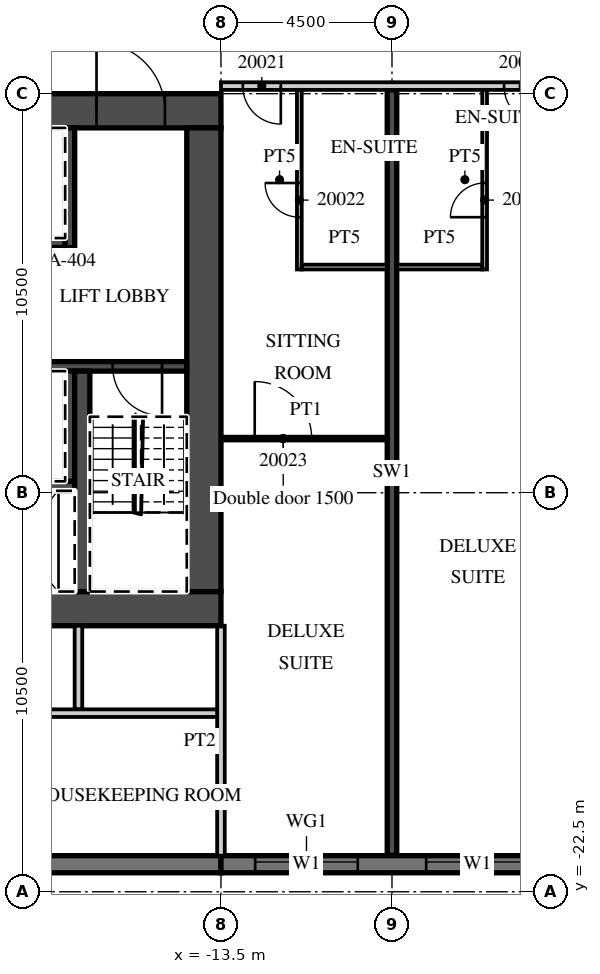
"""IFC4 building model, lengths in metres.
Left out: names, types, materials, properties, quantities, classifications, styles, units other than length and angle.
Written with IfcOpenShell. Run it as: python <this file> out.ifc"""

import sys

from ifc_helpers import new_model, si_unit, direction, frame, frame_2d, origin, place, context, subcontext, project, spatial, rectangle, extrude, element, fill, save


model = new_model("IFC4")
c1 = context("Model", 3, precision=1e-05, world=origin(), true_north=direction((0.0, 1.0)))
c2 = subcontext(c1, "Body", "Model", "MODEL_VIEW")
j1 = project(units=[si_unit("LENGTHUNIT", "METRE"), si_unit("PLANEANGLEUNIT", "RADIAN")], contexts=[c1])
p1 = place(None, origin())
s1 = spatial("IfcSite", under=j1, at=p1, CompositionType="ELEMENT")
p2 = place(p1, origin())
s2 = spatial("IfcBuilding", under=s1, at=p2, CompositionType="ELEMENT")
p3 = place(p2, frame((0.0, 0.0, 96.3)))
s3 = spatial("IfcBuildingStorey", under=s2, at=p3, CompositionType="ELEMENT", Elevation=96.3)
p4 = place(p3, frame((-9.0, -21.54, 0.0), z_axis=(0.0, 0.0, 1.0), x_axis=(0.0, 1.0, 0.0)))
e1 = element("IfcWall", 1, at=p4, inside=s3, PredefinedType="SHEAR", context=c2, shape_type="SweptSolid", body=[
    extrude(rectangle(XDim=20.14, YDim=0.25, at=frame_2d((10.07, 0.0))), origin(), (0.0, 0.0, 1.0), 3.0),
])
p5 = place(p3, frame((-31.5, -21.775, 0.0), z_axis=(0.0, 0.0, 1.0), x_axis=(1.0, 0.0, 0.0)))
e2 = element("IfcWall", 2, at=p5, inside=s3, PredefinedType="SOLIDWALL", context=c2, shape_type="SweptSolid", body=[
    extrude(rectangle(XDim=18.0, YDim=0.45, at=frame_2d((9.0, 0.0))), origin(), (0.0, 0.0, 1.0), 3.0),
])
p6 = place(p3, frame((-13.5, -21.775, 0.0), z_axis=(0.0, 0.0, 1.0), x_axis=(1.0, 0.0, 0.0)))
e3 = element("IfcWall", 3, at=p6, inside=s3, PredefinedType="SOLIDWALL", context=c2, shape_type="SweptSolid", body=[
    extrude(rectangle(XDim=54.5, YDim=0.45, at=frame_2d((27.25, 0.0))), origin(), (0.0, 0.0, 1.0), 3.0),
])
p7 = place(p6, frame((0.9, 0.0, 0.45)))
e4 = element("IfcOpeningElement", 4, at=p7, cuts=e3, PredefinedType="OPENING", context=c2, shape_type="SweptSolid", body=[
    extrude(rectangle(XDim=2.7, YDim=2.25, at=frame_2d((1.35, 1.125))), frame((0.0, 0.235, 0.0), z_axis=(0.0, -1.0, 0.0), x_axis=(1.0, 0.0, 0.0)), (0.0, 0.0, 1.0), 0.47),
])
p8 = place(p6, frame((5.4, 0.0, 0.45)))
e5 = element("IfcOpeningElement", 5, at=p8, cuts=e3, PredefinedType="OPENING", context=c2, shape_type="SweptSolid", body=[
    extrude(rectangle(XDim=2.7, YDim=2.25, at=frame_2d((1.35, 1.125))), frame((0.0, 0.235, 0.0), z_axis=(0.0, -1.0, 0.0), x_axis=(1.0, 0.0, 0.0)), (0.0, 0.0, 1.0), 0.47),
])
p9 = place(p6, frame((9.9, 0.0, 0.45)))
e6 = element("IfcOpeningElement", 6, at=p9, cuts=e3, PredefinedType="OPENING", context=c2, shape_type="SweptSolid", body=[
    extrude(rectangle(XDim=2.7, YDim=2.25, at=frame_2d((1.35, 1.125))), frame((0.0, 0.235, 0.0), z_axis=(0.0, -1.0, 0.0), x_axis=(1.0, 0.0, 0.0)), (0.0, 0.0, 1.0), 0.47),
])
p10 = place(p6, frame((14.4, 0.0, 0.45)))
e7 = element("IfcOpeningElement", 7, at=p10, cuts=e3, PredefinedType="OPENING", context=c2, shape_type="SweptSolid", body=[
    extrude(rectangle(XDim=2.7, YDim=2.25, at=frame_2d((1.35, 1.125))), frame((0.0, 0.235, 0.0), z_axis=(0.0, -1.0, 0.0), x_axis=(1.0, 0.0, 0.0)), (0.0, 0.0, 1.0), 0.47),
])
p11 = place(p6, frame((18.9, 0.0, 0.45)))
e8 = element("IfcOpeningElement", 8, at=p11, cuts=e3, PredefinedType="OPENING", context=c2, shape_type="SweptSolid", body=[
    extrude(rectangle(XDim=2.7, YDim=2.25, at=frame_2d((1.35, 1.125))), frame((0.0, 0.235, 0.0), z_axis=(0.0, -1.0, 0.0), x_axis=(1.0, 0.0, 0.0)), (0.0, 0.0, 1.0), 0.47),
])
p12 = place(p6, frame((23.4, 0.0, 0.45)))
e9 = element("IfcOpeningElement", 9, at=p12, cuts=e3, PredefinedType="OPENING", context=c2, shape_type="SweptSolid", body=[
    extrude(rectangle(XDim=2.7, YDim=2.25, at=frame_2d((1.35, 1.125))), frame((0.0, 0.235, 0.0), z_axis=(0.0, -1.0, 0.0), x_axis=(1.0, 0.0, 0.0)), (0.0, 0.0, 1.0), 0.47),
])
p13 = place(p6, frame((27.9, 0.0, 0.45)))
e10 = element("IfcOpeningElement", 10, at=p13, cuts=e3, PredefinedType="OPENING", context=c2, shape_type="SweptSolid", body=[
    extrude(rectangle(XDim=2.7, YDim=2.25, at=frame_2d((1.35, 1.125))), frame((0.0, 0.235, 0.0), z_axis=(0.0, -1.0, 0.0), x_axis=(1.0, 0.0, 0.0)), (0.0, 0.0, 1.0), 0.47),
])
p14 = place(p6, frame((32.4, 0.0, 0.45)))
e11 = element("IfcOpeningElement", 11, at=p14, cuts=e3, PredefinedType="OPENING", context=c2, shape_type="SweptSolid", body=[
    extrude(rectangle(XDim=2.7, YDim=2.25, at=frame_2d((1.35, 1.125))), frame((0.0, 0.235, 0.0), z_axis=(0.0, -1.0, 0.0), x_axis=(1.0, 0.0, 0.0)), (0.0, 0.0, 1.0), 0.47),
])
p15 = place(p6, frame((36.9, 0.0, 0.45)))
e12 = element("IfcOpeningElement", 12, at=p15, cuts=e3, PredefinedType="OPENING", context=c2, shape_type="SweptSolid", body=[
    extrude(rectangle(XDim=2.7, YDim=2.25, at=frame_2d((1.35, 1.125))), frame((0.0, 0.235, 0.0), z_axis=(0.0, -1.0, 0.0), x_axis=(1.0, 0.0, 0.0)), (0.0, 0.0, 1.0), 0.47),
])
p16 = place(p6, frame((41.4, 0.0, 0.45)))
e13 = element("IfcOpeningElement", 13, at=p16, cuts=e3, PredefinedType="OPENING", context=c2, shape_type="SweptSolid", body=[
    extrude(rectangle(XDim=2.7, YDim=2.25, at=frame_2d((1.35, 1.125))), frame((0.0, 0.235, 0.0), z_axis=(0.0, -1.0, 0.0), x_axis=(1.0, 0.0, 0.0)), (0.0, 0.0, 1.0), 0.47),
])
p17 = place(p6, frame((45.9, 0.0, 0.45)))
e14 = element("IfcOpeningElement", 14, at=p17, cuts=e3, PredefinedType="OPENING", context=c2, shape_type="SweptSolid", body=[
    extrude(rectangle(XDim=2.7, YDim=2.25, at=frame_2d((1.35, 1.125))), frame((0.0, 0.235, 0.0), z_axis=(0.0, -1.0, 0.0), x_axis=(1.0, 0.0, 0.0)), (0.0, 0.0, 1.0), 0.47),
])
p18 = place(p6, frame((50.4, 0.0, 0.45)))
e15 = element("IfcOpeningElement", 15, at=p18, cuts=e3, PredefinedType="OPENING", context=c2, shape_type="SweptSolid", body=[
    extrude(rectangle(XDim=2.7, YDim=2.25, at=frame_2d((1.35, 1.125))), frame((0.0, 0.235, 0.0), z_axis=(0.0, -1.0, 0.0), x_axis=(1.0, 0.0, 0.0)), (0.0, 0.0, 1.0), 0.47),
])
p19 = place(p3, frame((-13.5, -21.55, 0.0), z_axis=(0.0, 0.0, 1.0), x_axis=(0.0, 1.0, 0.0)))
e16 = element("IfcWall", 16, at=p19, inside=s3, PredefinedType="PARTITIONING", context=c2, shape_type="SweptSolid", body=[
    extrude(rectangle(XDim=6.05, YDim=0.2, at=frame_2d((3.025, 0.0))), origin(), (0.0, 0.0, 1.0), 3.0),
])
p20 = place(p3, frame((-13.5, -1.3, 0.0), z_axis=(0.0, 0.0, 1.0), x_axis=(1.0, 0.0, 0.0)))
e17 = element("IfcWall", 17, at=p20, inside=s3, PredefinedType="PARTITIONING", context=c2, shape_type="SweptSolid", body=[
    extrude(rectangle(XDim=58.05, YDim=0.2, at=frame_2d((29.025, 0.0))), origin(), (0.0, 0.0, 1.0), 3.0),
])
p21 = place(p20, frame((0.575, 0.0, 0.0)))
e18 = element("IfcOpeningElement", 18, at=p21, cuts=e17, PredefinedType="OPENING", context=c2, shape_type="SweptSolid", body=[
    extrude(rectangle(XDim=1.0, YDim=2.1, at=frame_2d((0.5, 1.05))), frame((0.0, 0.11, 0.0), z_axis=(0.0, -1.0, 0.0), x_axis=(1.0, 0.0, 0.0)), (0.0, 0.0, 1.0), 0.22),
])
p22 = place(p20, frame((7.45, 0.0, 0.0)))
e19 = element("IfcOpeningElement", 19, at=p22, cuts=e17, PredefinedType="OPENING", context=c2, shape_type="SweptSolid", body=[
    extrude(rectangle(XDim=1.0, YDim=2.1, at=frame_2d((0.5, 1.05))), frame((0.0, 0.11, 0.0), z_axis=(0.0, -1.0, 0.0), x_axis=(1.0, 0.0, 0.0)), (0.0, 0.0, 1.0), 0.22),
])
p23 = place(p20, frame((11.925, 0.0, 0.0)))
e20 = element("IfcOpeningElement", 20, at=p23, cuts=e17, PredefinedType="OPENING", context=c2, shape_type="SweptSolid", body=[
    extrude(rectangle(XDim=1.0, YDim=2.1, at=frame_2d((0.5, 1.05))), frame((0.0, 0.11, 0.0), z_axis=(0.0, -1.0, 0.0), x_axis=(1.0, 0.0, 0.0)), (0.0, 0.0, 1.0), 0.22),
])
p24 = place(p20, frame((14.075, 0.0, 0.0)))
e21 = element("IfcOpeningElement", 21, at=p24, cuts=e17, PredefinedType="OPENING", context=c2, shape_type="SweptSolid", body=[
    extrude(rectangle(XDim=1.0, YDim=2.1, at=frame_2d((0.5, 1.05))), frame((0.0, 0.11, 0.0), z_axis=(0.0, -1.0, 0.0), x_axis=(1.0, 0.0, 0.0)), (0.0, 0.0, 1.0), 0.22),
])
p25 = place(p20, frame((20.925, 0.0, 0.0)))
e22 = element("IfcOpeningElement", 22, at=p25, cuts=e17, PredefinedType="OPENING", context=c2, shape_type="SweptSolid", body=[
    extrude(rectangle(XDim=1.0, YDim=2.1, at=frame_2d((0.5, 1.05))), frame((0.0, 0.11, 0.0), z_axis=(0.0, -1.0, 0.0), x_axis=(1.0, 0.0, 0.0)), (0.0, 0.0, 1.0), 0.22),
])
p26 = place(p20, frame((27.862, 0.0, 0.0)))
e23 = element("IfcOpeningElement", 23, at=p26, cuts=e17, PredefinedType="OPENING", context=c2, shape_type="SweptSolid", body=[
    extrude(rectangle(XDim=1.2, YDim=2.1, at=frame_2d((0.6, 1.05))), frame((0.0, 0.11, 0.0), z_axis=(0.0, -1.0, 0.0), x_axis=(1.0, 0.0, 0.0)), (0.0, 0.0, 1.0), 0.22),
])
p27 = place(p20, frame((33.938, 0.0, 0.0)))
e24 = element("IfcOpeningElement", 24, at=p27, cuts=e17, PredefinedType="OPENING", context=c2, shape_type="SweptSolid", body=[
    extrude(rectangle(XDim=1.2, YDim=2.1, at=frame_2d((0.6, 1.05))), frame((0.0, 0.11, 0.0), z_axis=(0.0, -1.0, 0.0), x_axis=(1.0, 0.0, 0.0)), (0.0, 0.0, 1.0), 0.22),
])
p28 = place(p20, frame((45.862, 0.0, 0.0)))
e25 = element("IfcOpeningElement", 25, at=p28, cuts=e17, PredefinedType="OPENING", context=c2, shape_type="SweptSolid", body=[
    extrude(rectangle(XDim=1.2, YDim=2.1, at=frame_2d((0.6, 1.05))), frame((0.0, 0.11, 0.0), z_axis=(0.0, -1.0, 0.0), x_axis=(1.0, 0.0, 0.0)), (0.0, 0.0, 1.0), 0.22),
])
p29 = place(p20, frame((52.425, 0.0, 0.0)))
e26 = element("IfcOpeningElement", 26, at=p29, cuts=e17, PredefinedType="OPENING", context=c2, shape_type="SweptSolid", body=[
    extrude(rectangle(XDim=1.0, YDim=2.1, at=frame_2d((0.5, 1.05))), frame((0.0, 0.11, 0.0), z_axis=(0.0, -1.0, 0.0), x_axis=(1.0, 0.0, 0.0)), (0.0, 0.0, 1.0), 0.22),
])
p30 = place(p20, frame((56.525, 0.0, 0.0)))
e27 = element("IfcOpeningElement", 27, at=p30, cuts=e17, PredefinedType="OPENING", context=c2, shape_type="SweptSolid", body=[
    extrude(rectangle(XDim=1.0, YDim=2.1, at=frame_2d((0.5, 1.05))), frame((0.0, 0.11, 0.0), z_axis=(0.0, -1.0, 0.0), x_axis=(1.0, 0.0, 0.0)), (0.0, 0.0, 1.0), 0.22),
])
p31 = place(p3, frame((-11.438, -6.125, 0.0), z_axis=(0.0, 0.0, 1.0), x_axis=(0.0, 1.0, 0.0)))
e28 = element("IfcWall", 28, at=p31, inside=s3, PredefinedType="PARTITIONING", context=c2, shape_type="SweptSolid", body=[
    extrude(rectangle(XDim=4.725, YDim=0.125, at=frame_2d((2.363, 0.0))), origin(), (0.0, 0.0, 1.0), 3.0),
])
p32 = place(p31, frame((1.375, 0.0, 0.0)))
e29 = element("IfcOpeningElement", 29, at=p32, cuts=e28, PredefinedType="OPENING", context=c2, shape_type="SweptSolid", body=[
    extrude(rectangle(XDim=0.9, YDim=2.1, at=frame_2d((0.45, 1.05))), frame((0.0, 0.073, 0.0), z_axis=(0.0, -1.0, 0.0), x_axis=(1.0, 0.0, 0.0)), (0.0, 0.0, 1.0), 0.145),
])
p33 = place(p3, frame((-11.375, -6.062, 0.0), z_axis=(0.0, 0.0, 1.0), x_axis=(1.0, 0.0, 0.0)))
e30 = element("IfcWall", 30, at=p33, inside=s3, PredefinedType="PARTITIONING", context=c2, shape_type="SweptSolid", body=[
    extrude(rectangle(XDim=2.25, YDim=0.125, at=frame_2d((1.125, 0.0))), origin(), (0.0, 0.0, 1.0), 3.0),
])
p34 = place(p3, frame((-13.4, -10.575, 0.0), z_axis=(0.0, 0.0, 1.0), x_axis=(1.0, 0.0, 0.0)))
e31 = element("IfcWall", 31, at=p34, inside=s3, PredefinedType="PARTITIONING", context=c2, shape_type="SweptSolid", body=[
    extrude(rectangle(XDim=4.275, YDim=0.1, at=frame_2d((2.137, 0.0))), origin(), (0.0, 0.0, 1.0), 3.0),
])
p35 = place(p34, frame((0.788, 0.0, 0.0)))
e32 = element("IfcOpeningElement", 32, at=p35, cuts=e31, PredefinedType="OPENING", context=c2, shape_type="SweptSolid", body=[
    extrude(rectangle(XDim=1.5, YDim=2.1, at=frame_2d((0.75, 1.05))), frame((0.0, 0.06, 0.0), z_axis=(0.0, -1.0, 0.0), x_axis=(1.0, 0.0, 0.0)), (0.0, 0.0, 1.0), 0.12),
])
p36 = place(p3, frame((-6.562, -6.125, 0.0), z_axis=(0.0, 0.0, 1.0), x_axis=(0.0, 1.0, 0.0)))
e33 = element("IfcWall", 33, at=p36, inside=s3, PredefinedType="PARTITIONING", context=c2, shape_type="SweptSolid", body=[
    extrude(rectangle(XDim=4.725, YDim=0.125, at=frame_2d((2.363, 0.0))), origin(), (0.0, 0.0, 1.0), 3.0),
])
p37 = place(p36, frame((1.375, 0.0, 0.0)))
e34 = element("IfcOpeningElement", 34, at=p37, cuts=e33, PredefinedType="OPENING", context=c2, shape_type="SweptSolid", body=[
    extrude(rectangle(XDim=0.9, YDim=2.1, at=frame_2d((0.45, 1.05))), frame((0.0, 0.073, 0.0), z_axis=(0.0, -1.0, 0.0), x_axis=(1.0, 0.0, 0.0)), (0.0, 0.0, 1.0), 0.145),
])
p38 = place(p3, frame((-8.875, -6.062, 0.0), z_axis=(0.0, 0.0, 1.0), x_axis=(1.0, 0.0, 0.0)))
e35 = element("IfcWall", 35, at=p38, inside=s3, PredefinedType="PARTITIONING", context=c2, shape_type="SweptSolid", body=[
    extrude(rectangle(XDim=2.25, YDim=0.125, at=frame_2d((1.125, 0.0))), origin(), (0.0, 0.0, 1.0), 3.0),
])
p39 = place(p3, frame((-31.5, -1.95, 0.0), z_axis=(0.0, 0.0, 1.0), x_axis=(1.0, 0.0, 0.0)))
e36 = element("IfcWall", 36, at=p39, inside=s3, PredefinedType="SHEAR", context=c2, shape_type="SweptSolid", body=[
    extrude(rectangle(XDim=18.0, YDim=0.9, at=frame_2d((9.0, 0.0))), origin(), (0.0, 0.0, 1.0), 3.0),
])
p40 = place(p39, frame((14.725, 0.0, 0.0)))
e37 = element("IfcOpeningElement", 37, at=p40, cuts=e36, PredefinedType="OPENING", context=c2, shape_type="SweptSolid", body=[
    extrude(rectangle(XDim=1.8, YDim=2.1, at=frame_2d((0.9, 1.05))), frame((0.0, 0.46, 0.0), z_axis=(0.0, -1.0, 0.0), x_axis=(1.0, 0.0, 0.0)), (0.0, 0.0, 1.0), 0.92),
])
p41 = place(p3, frame((-20.3, -15.05, 0.0), z_axis=(0.0, 0.0, 1.0), x_axis=(1.0, 0.0, 0.0)))
e38 = element("IfcWall", 38, at=p41, inside=s3, PredefinedType="SHEAR", context=c2, shape_type="SweptSolid", body=[
    extrude(rectangle(XDim=6.8, YDim=0.9, at=frame_2d((3.4, 0.0))), origin(), (0.0, 0.0, 1.0), 3.0),
])
p42 = place(p41, frame((0.875, 0.0, 0.0)))
e39 = element("IfcOpeningElement", 39, at=p42, cuts=e38, PredefinedType="OPENING", context=c2, shape_type="SweptSolid", body=[
    extrude(rectangle(XDim=1.2, YDim=2.1, at=frame_2d((0.6, 1.05))), frame((0.0, 0.46, 0.0), z_axis=(0.0, -1.0, 0.0), x_axis=(1.0, 0.0, 0.0)), (0.0, 0.0, 1.0), 0.92),
])
p43 = place(p3, frame((-13.95, -14.6, 0.0), z_axis=(0.0, 0.0, 1.0), x_axis=(0.0, 1.0, 0.0)))
e40 = element("IfcWall", 40, at=p43, inside=s3, PredefinedType="SHEAR", context=c2, shape_type="SweptSolid", body=[
    extrude(rectangle(XDim=12.2, YDim=0.9, at=frame_2d((6.1, 0.0))), origin(), (0.0, 0.0, 1.0), 3.0),
])
p44 = place(p3, frame((-30.6, -5.425, 0.0), z_axis=(0.0, 0.0, 1.0), x_axis=(1.0, 0.0, 0.0)))
e41 = element("IfcWall", 41, at=p44, inside=s3, PredefinedType="SHEAR", context=c2, shape_type="SweptSolid", body=[
    extrude(rectangle(XDim=13.0, YDim=0.25, at=frame_2d((6.5, 0.0))), origin(), (0.0, 0.0, 1.0), 3.0),
])
p45 = place(p3, frame((-17.475, -5.55, 0.0), z_axis=(0.0, 0.0, 1.0), x_axis=(0.0, 1.0, 0.0)))
e42 = element("IfcWall", 42, at=p45, inside=s3, PredefinedType="SHEAR", context=c2, shape_type="SweptSolid", body=[
    extrude(rectangle(XDim=3.15, YDim=0.25, at=frame_2d((1.575, 0.0))), origin(), (0.0, 0.0, 1.0), 3.0),
])
p46 = place(p3, frame((-30.6, -8.675, 0.0), z_axis=(0.0, 0.0, 1.0), x_axis=(1.0, 0.0, 0.0)))
e43 = element("IfcWall", 43, at=p46, inside=s3, PredefinedType="SHEAR", context=c2, shape_type="SweptSolid", body=[
    extrude(rectangle(XDim=16.2, YDim=0.25, at=frame_2d((8.1, 0.0))), origin(), (0.0, 0.0, 1.0), 3.0),
])
p47 = place(p46, frame((0.6, 0.0, 0.0)))
e44 = element("IfcOpeningElement", 44, at=p47, cuts=e43, PredefinedType="OPENING", context=c2, shape_type="SweptSolid", body=[
    extrude(rectangle(XDim=1.2, YDim=2.1, at=frame_2d((0.6, 1.05))), frame((0.0, 0.135, 0.0), z_axis=(0.0, -1.0, 0.0), x_axis=(1.0, 0.0, 0.0)), (0.0, 0.0, 1.0), 0.27),
])
p48 = place(p46, frame((3.25, 0.0, 0.0)))
e45 = element("IfcOpeningElement", 45, at=p48, cuts=e43, PredefinedType="OPENING", context=c2, shape_type="SweptSolid", body=[
    extrude(rectangle(XDim=1.2, YDim=2.1, at=frame_2d((0.6, 1.05))), frame((0.0, 0.135, 0.0), z_axis=(0.0, -1.0, 0.0), x_axis=(1.0, 0.0, 0.0)), (0.0, 0.0, 1.0), 0.27),
])
p49 = place(p46, frame((5.9, 0.0, 0.0)))
e46 = element("IfcOpeningElement", 46, at=p49, cuts=e43, PredefinedType="OPENING", context=c2, shape_type="SweptSolid", body=[
    extrude(rectangle(XDim=1.2, YDim=2.1, at=frame_2d((0.6, 1.05))), frame((0.0, 0.135, 0.0), z_axis=(0.0, -1.0, 0.0), x_axis=(1.0, 0.0, 0.0)), (0.0, 0.0, 1.0), 0.27),
])
p50 = place(p46, frame((14.25, 0.0, 0.0)))
e47 = element("IfcOpeningElement", 47, at=p50, cuts=e43, PredefinedType="OPENING", context=c2, shape_type="SweptSolid", body=[
    extrude(rectangle(XDim=1.3, YDim=2.1, at=frame_2d((0.65, 1.05))), frame((0.0, 0.135, 0.0), z_axis=(0.0, -1.0, 0.0), x_axis=(1.0, 0.0, 0.0)), (0.0, 0.0, 1.0), 0.27),
])
p51 = place(p3, frame((-30.6, -11.825, 0.0), z_axis=(0.0, 0.0, 1.0), x_axis=(1.0, 0.0, 0.0)))
e48 = element("IfcWall", 48, at=p51, inside=s3, PredefinedType="SHEAR", context=c2, shape_type="SweptSolid", body=[
    extrude(rectangle(XDim=13.25, YDim=0.25, at=frame_2d((6.625, 0.0))), origin(), (0.0, 0.0, 1.0), 3.0),
])
p52 = place(p3, frame((-17.475, -11.7, 0.0), z_axis=(0.0, 0.0, 1.0), x_axis=(0.0, 1.0, 0.0)))
e49 = element("IfcWall", 49, at=p52, inside=s3, PredefinedType="SHEAR", context=c2, shape_type="SweptSolid", body=[
    extrude(rectangle(XDim=2.9, YDim=0.25, at=frame_2d((1.45, 0.0))), origin(), (0.0, 0.0, 1.0), 3.0),
])
p53 = place(p3, frame((-17.15, -14.6, 0.0), z_axis=(0.0, 0.0, 1.0), x_axis=(0.0, 1.0, 0.0)))
e50 = element("IfcWall", 50, at=p53, inside=s3, PredefinedType="SHEAR", context=c2, shape_type="SweptSolid", body=[
    extrude(rectangle(XDim=5.8, YDim=0.4, at=frame_2d((2.9, 0.0))), origin(), (0.0, 0.0, 1.0), 3.0),
])
p54 = place(p3, frame((-17.25, -17.7, 0.0), z_axis=(0.0, 0.0, 1.0), x_axis=(0.0, 1.0, 0.0)))
e51 = element("IfcWall", 51, at=p54, inside=s3, PredefinedType="PARTITIONING", context=c2, shape_type="SweptSolid", body=[
    extrude(rectangle(XDim=2.2, YDim=0.2, at=frame_2d((1.1, 0.0))), origin(), (0.0, 0.0, 1.0), 3.0),
])
p55 = place(p3, frame((-44.55, -17.8, 0.0), z_axis=(0.0, 0.0, 1.0), x_axis=(1.0, 0.0, 0.0)))
e52 = element("IfcWall", 52, at=p55, inside=s3, PredefinedType="PARTITIONING", context=c2, shape_type="SweptSolid", body=[
    extrude(rectangle(XDim=30.95, YDim=0.2, at=frame_2d((15.475, 0.0))), origin(), (0.0, 0.0, 1.0), 3.0),
])
p56 = place(p55, frame((12.238, 0.0, 0.0)))
e53 = element("IfcOpeningElement", 53, at=p56, cuts=e52, PredefinedType="OPENING", context=c2, shape_type="SweptSolid", body=[
    extrude(rectangle(XDim=0.9, YDim=2.1, at=frame_2d((0.45, 1.05))), frame((0.0, 0.11, 0.0), z_axis=(0.0, -1.0, 0.0), x_axis=(1.0, 0.0, 0.0)), (0.0, 0.0, 1.0), 0.22),
])
p57 = place(p55, frame((20.538, 0.0, 0.0)))
e54 = element("IfcOpeningElement", 54, at=p57, cuts=e52, PredefinedType="OPENING", context=c2, shape_type="SweptSolid", body=[
    extrude(rectangle(XDim=0.9, YDim=2.1, at=frame_2d((0.45, 1.05))), frame((0.0, 0.11, 0.0), z_axis=(0.0, -1.0, 0.0), x_axis=(1.0, 0.0, 0.0)), (0.0, 0.0, 1.0), 0.22),
])
p58 = place(p7, origin())
e55 = element("IfcWindow", 55, at=p58, inside=s3, PartitioningType="SINGLE_PANEL", PredefinedType="WINDOW", context=c2, shape_type="SweptSolid", body=[
    extrude(rectangle(XDim=2.7, YDim=2.25, at=frame_2d((1.35, 1.125))), frame((0.0, 0.09, 0.0), z_axis=(0.0, -1.0, 0.0), x_axis=(1.0, 0.0, 0.0)), (0.0, 0.0, 1.0), 0.06),
])
fill(e4, e55)
p59 = place(p8, origin())
e56 = element("IfcWindow", 56, at=p59, inside=s3, PartitioningType="SINGLE_PANEL", PredefinedType="WINDOW", context=c2, shape_type="SweptSolid", body=[
    extrude(rectangle(XDim=2.7, YDim=2.25, at=frame_2d((1.35, 1.125))), frame((0.0, 0.09, 0.0), z_axis=(0.0, -1.0, 0.0), x_axis=(1.0, 0.0, 0.0)), (0.0, 0.0, 1.0), 0.06),
])
fill(e5, e56)
p60 = place(p21, origin())
e57 = element("IfcDoor", 57, at=p60, inside=s3, OperationType="SINGLE_SWING_RIGHT", PredefinedType="DOOR", context=c2, shape_type="SweptSolid", body=[
    extrude(rectangle(XDim=1.0, YDim=2.1, at=frame_2d((0.5, 1.05))), frame((0.0, 0.025, 0.0), z_axis=(0.0, -1.0, 0.0), x_axis=(1.0, 0.0, 0.0)), (0.0, 0.0, 1.0), 0.05),
])
fill(e18, e57)
p61 = place(p32, origin())
e58 = element("IfcDoor", 58, at=p61, inside=s3, OperationType="SINGLE_SWING_RIGHT", PredefinedType="DOOR", context=c2, shape_type="SweptSolid", body=[
    extrude(rectangle(XDim=0.9, YDim=2.1, at=frame_2d((0.45, 1.05))), frame((0.0, 0.025, 0.0), z_axis=(0.0, -1.0, 0.0), x_axis=(1.0, 0.0, 0.0)), (0.0, 0.0, 1.0), 0.05),
])
fill(e29, e58)
p62 = place(p35, origin())
e59 = element("IfcDoor", 59, at=p62, inside=s3, OperationType="SINGLE_SWING_LEFT", PredefinedType="DOOR", context=c2, shape_type="SweptSolid", body=[
    extrude(rectangle(XDim=1.5, YDim=2.1, at=frame_2d((0.75, 1.05))), frame((0.0, 0.025, 0.0), z_axis=(0.0, -1.0, 0.0), x_axis=(1.0, 0.0, 0.0)), (0.0, 0.0, 1.0), 0.05),
])
fill(e32, e59)
p63 = place(p22, origin())
e60 = element("IfcDoor", 60, at=p63, inside=s3, OperationType="SINGLE_SWING_RIGHT", PredefinedType="DOOR", context=c2, shape_type="SweptSolid", body=[
    extrude(rectangle(XDim=1.0, YDim=2.1, at=frame_2d((0.5, 1.05))), frame((0.0, 0.025, 0.0), z_axis=(0.0, -1.0, 0.0), x_axis=(1.0, 0.0, 0.0)), (0.0, 0.0, 1.0), 0.05),
])
fill(e19, e60)
p64 = place(p37, origin())
e61 = element("IfcDoor", 61, at=p64, inside=s3, OperationType="SINGLE_SWING_LEFT", PredefinedType="DOOR", context=c2, shape_type="SweptSolid", body=[
    extrude(rectangle(XDim=0.9, YDim=2.1, at=frame_2d((0.45, 1.05))), frame((0.0, 0.025, 0.0), z_axis=(0.0, -1.0, 0.0), x_axis=(1.0, 0.0, 0.0)), (0.0, 0.0, 1.0), 0.05),
])
fill(e34, e61)
p65 = place(p40, origin())
e62 = element("IfcDoor", 62, at=p65, inside=s3, OperationType="DOUBLE_DOOR_DOUBLE_SWING", PredefinedType="DOOR", context=c2, shape_type="SweptSolid", body=[
    extrude(rectangle(XDim=1.8, YDim=2.1, at=frame_2d((0.9, 1.05))), frame((0.0, 0.025, 0.0), z_axis=(0.0, -1.0, 0.0), x_axis=(1.0, 0.0, 0.0)), (0.0, 0.0, 1.0), 0.05),
])
fill(e37, e62)
p66 = place(p50, origin())
e63 = element("IfcDoor", 63, at=p66, inside=s3, OperationType="SINGLE_SWING_RIGHT", PredefinedType="DOOR", context=c2, shape_type="SweptSolid", body=[
    extrude(rectangle(XDim=1.3, YDim=2.1, at=frame_2d((0.65, 1.05))), frame((0.0, 0.025, 0.0), z_axis=(0.0, -1.0, 0.0), x_axis=(1.0, 0.0, 0.0)), (0.0, 0.0, 1.0), 0.05),
])
fill(e47, e63)
save(model, sys.argv[1])
